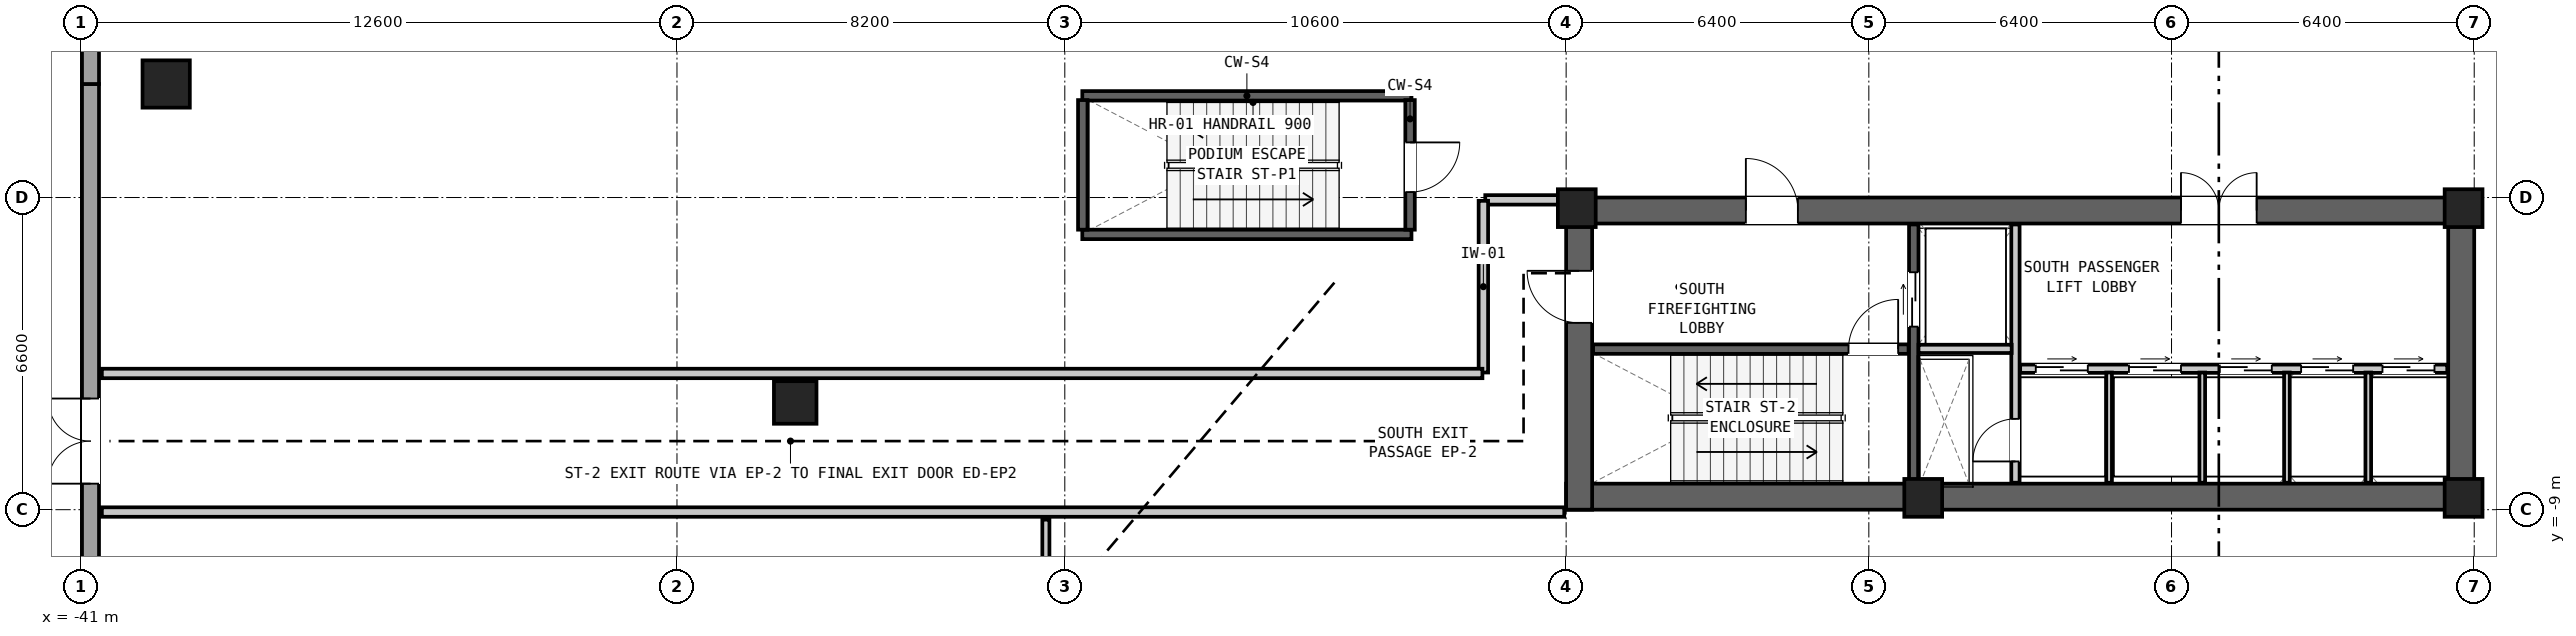
"""IFC4 building model, lengths in metres.
Left out: names, types, materials, properties, quantities, classifications, styles, units other than length and angle.
Written with IfcOpenShell. Run it as: python <this file> out.ifc"""

import sys

from ifc_helpers import new_model, si_unit, direction, frame, frame_2d, origin, origin_2d, place, context, subcontext, project, spatial, rectangle, hollow_rectangle, extrude, element, fill, save


model = new_model("IFC4")
c1 = context("Model", 3, precision=1e-05, world=origin(), true_north=direction((0.0, 1.0)))
c2 = subcontext(c1, "Body", "Model", "MODEL_VIEW")
j1 = project(units=[si_unit("LENGTHUNIT", "METRE"), si_unit("PLANEANGLEUNIT", "RADIAN")], contexts=[c1])
p1 = place(None, origin())
s1 = spatial("IfcSite", under=j1, at=p1, CompositionType="ELEMENT")
p2 = place(p1, origin())
s2 = spatial("IfcBuilding", under=s1, at=p2, CompositionType="ELEMENT")
p3 = place(p2, origin())
s3 = spatial("IfcBuildingStorey", under=s2, at=p3, CompositionType="ELEMENT", Elevation=0.0)
p4 = place(p3, frame((-9.6, -8.725, 0.0), z_axis=(0.0, 0.0, 1.0), x_axis=(1.0, 0.0, 0.0)))
e1 = element("IfcWall", 1, at=p4, inside=s3, PredefinedType="SHEAR", context=c2, shape_type="SweptSolid", body=[
    extrude(rectangle(XDim=19.2, YDim=0.55, at=frame_2d((9.6, 0.0))), origin(), (0.0, 0.0, 1.0), 5.1),
])
p5 = place(p3, frame((-9.6, -2.675, 0.0), z_axis=(0.0, 0.0, 1.0), x_axis=(1.0, 0.0, 0.0)))
e2 = element("IfcWall", 2, at=p5, inside=s3, PredefinedType="SHEAR", context=c2, shape_type="SweptSolid", body=[
    extrude(rectangle(XDim=19.2, YDim=0.55, at=frame_2d((9.6, 0.0))), origin(), (0.0, 0.0, 1.0), 5.1),
])
p6 = place(p5, frame((3.8, 0.0, 0.0)))
e3 = element("IfcOpeningElement", 3, at=p6, cuts=e2, PredefinedType="OPENING", context=c2, shape_type="SweptSolid", body=[
    extrude(rectangle(XDim=1.1, YDim=2.08, at=frame_2d((0.55, 1.04))), frame((0.0, 0.287, 0.0), z_axis=(0.0, -1.0, 0.0), x_axis=(1.0, 0.0, 0.0)), (0.0, 0.0, 1.0), 0.574),
])
p7 = place(p5, frame((13.0, 0.0, 0.0)))
e4 = element("IfcOpeningElement", 4, at=p7, cuts=e2, PredefinedType="OPENING", context=c2, shape_type="SweptSolid", body=[
    extrude(rectangle(XDim=1.6, YDim=2.12, at=frame_2d((0.8, 1.06))), frame((0.0, 0.287, 0.0), z_axis=(0.0, -1.0, 0.0), x_axis=(1.0, 0.0, 0.0)), (0.0, 0.0, 1.0), 0.574),
])
p8 = place(p3, frame((-9.325, -9.0, 0.0), z_axis=(0.0, 0.0, 1.0), x_axis=(0.0, 1.0, 0.0)))
e5 = element("IfcWall", 5, at=p8, inside=s3, PredefinedType="SHEAR", context=c2, shape_type="SweptSolid", body=[
    extrude(rectangle(XDim=6.6, YDim=0.55, at=frame_2d((3.3, 0.0))), origin(), (0.0, 0.0, 1.0), 5.1),
])
p9 = place(p8, frame((3.95, 0.0, 0.0)))
e6 = element("IfcOpeningElement", 6, at=p9, cuts=e5, PredefinedType="OPENING", context=c2, shape_type="SweptSolid", body=[
    extrude(rectangle(XDim=1.1, YDim=2.08, at=frame_2d((0.55, 1.04))), frame((0.0, 0.287, 0.0), z_axis=(0.0, -1.0, 0.0), x_axis=(1.0, 0.0, 0.0)), (0.0, 0.0, 1.0), 0.574),
])
p10 = place(p3, frame((9.325, -9.0, 0.0), z_axis=(0.0, 0.0, 1.0), x_axis=(0.0, 1.0, 0.0)))
e7 = element("IfcWall", 7, at=p10, inside=s3, PredefinedType="SHEAR", context=c2, shape_type="SweptSolid", body=[
    extrude(rectangle(XDim=6.6, YDim=0.55, at=frame_2d((3.3, 0.0))), origin(), (0.0, 0.0, 1.0), 5.1),
])
p11 = place(p3, frame((-25.9, -6.733, 0.0), z_axis=(0.0, 0.0, 1.0), x_axis=(0.0, 1.0, 0.0)))
e8 = element("IfcColumn", 8, at=p11, inside=s3, PredefinedType="COLUMN", context=c2, shape_type="SweptSolid", body=[
    extrude(hollow_rectangle(XDim=0.9, YDim=0.9, WallThickness=0.055, at=origin_2d()), origin(), (0.0, 0.0, 1.0), 5.1),
])
p12 = place(p3, frame((-39.2, 0.0, 0.0), z_axis=(0.0, 0.0, 1.0), x_axis=(1.0, 0.0, 0.0)))
e9 = element("IfcColumn", 9, at=p12, inside=s3, PredefinedType="COLUMN", context=c2, shape_type="SweptSolid", body=[
    extrude(rectangle(XDim=1.0, YDim=1.0, at=origin_2d()), origin(), (0.0, 0.0, 1.0), 5.1),
])
for number, where, z_axis, x_axis in (
    (10, (-9.375, -2.625, 0.0), (0.0, 0.0, 1.0), (1.0, 0.0, 0.0)),
    (11, (9.375, -2.625, 0.0), (0.0, 0.0, 1.0), (1.0, 0.0, 0.0)),
    (12, (-2.05, -8.75, 0.0), (0.0, 0.0, 1.0), (1.0, 0.0, 0.0)),
    (13, (9.375, -8.75, 0.0), (0.0, 0.0, 1.0), (1.0, 0.0, 0.0)),
):
    element("IfcColumn", number, at=place(p3, frame(where, z_axis=z_axis, x_axis=x_axis)), inside=s3, PredefinedType="COLUMN", context=c2, shape_type="SweptSolid", body=[
        extrude(rectangle(XDim=0.8, YDim=0.8, at=origin_2d()), origin(), (0.0, 0.0, 1.0), 5.1),
    ])
p13 = place(p3, frame((-40.8, -27.8, 0.0), z_axis=(0.0, 0.0, 1.0), x_axis=(0.0, 1.0, 0.0)))
e14 = element("IfcWall", 14, at=p13, inside=s3, PredefinedType="SOLIDWALL", context=c2, shape_type="SweptSolid", body=[
    extrude(rectangle(XDim=27.8, YDim=0.36, at=frame_2d((13.9, 0.0))), origin(), (0.0, 0.0, 1.0), 4.78),
])
p14 = place(p13, frame((19.35, 0.0, 0.0)))
e15 = element("IfcOpeningElement", 15, at=p14, cuts=e14, PredefinedType="OPENING", context=c2, shape_type="SweptSolid", body=[
    extrude(rectangle(XDim=1.8, YDim=2.25, at=frame_2d((0.9, 1.125))), frame((0.0, 0.192, 0.0), z_axis=(0.0, -1.0, 0.0), x_axis=(1.0, 0.0, 0.0)), (0.0, 0.0, 1.0), 0.384),
])
p15 = place(p3, frame((-40.8, 0.0, 0.0), z_axis=(0.0, 0.0, 1.0), x_axis=(0.0, 1.0, 0.0)))
e16 = element("IfcWall", 16, at=p15, inside=s3, PredefinedType="SOLIDWALL", context=c2, shape_type="SweptSolid", body=[
    extrude(rectangle(XDim=27.8, YDim=0.36, at=frame_2d((13.9, 0.0))), origin(), (0.0, 0.0, 1.0), 4.78),
])
p16 = place(p3, frame((-9.03, -5.605, 0.0), z_axis=(0.0, 0.0, 1.0), x_axis=(1.0, 0.0, 0.0)))
e17 = element("IfcWall", 17, at=p16, inside=s3, PredefinedType="SHEAR", context=c2, shape_type="SweptSolid", body=[
    extrude(rectangle(XDim=6.67, YDim=0.2, at=frame_2d((3.335, 0.0))), origin(), (0.0, 0.0, 1.0), 4.78),
])
p17 = place(p16, frame((5.4, 0.0, 0.0)))
e18 = element("IfcOpeningElement", 18, at=p17, cuts=e17, PredefinedType="OPENING", context=c2, shape_type="SweptSolid", body=[
    extrude(rectangle(XDim=1.05, YDim=2.08, at=frame_2d((0.525, 1.04))), frame((0.0, 0.112, 0.0), z_axis=(0.0, -1.0, 0.0), x_axis=(1.0, 0.0, 0.0)), (0.0, 0.0, 1.0), 0.224),
])
p18 = place(p3, frame((-2.25, -8.43, 0.0), z_axis=(0.0, 0.0, 1.0), x_axis=(0.0, 1.0, 0.0)))
e19 = element("IfcWall", 19, at=p18, inside=s3, PredefinedType="SHEAR", context=c2, shape_type="SweptSolid", body=[
    extrude(rectangle(XDim=5.46, YDim=0.2, at=frame_2d((2.73, 0.0))), origin(), (0.0, 0.0, 1.0), 4.78),
])
p19 = place(p18, frame((3.3, 0.0, 0.0)))
e20 = element("IfcOpeningElement", 20, at=p19, cuts=e19, PredefinedType="OPENING", context=c2, shape_type="SweptSolid", body=[
    extrude(rectangle(XDim=1.15, YDim=2.08, at=frame_2d((0.575, 1.04))), frame((0.0, 0.112, 0.0), z_axis=(0.0, -1.0, 0.0), x_axis=(1.0, 0.0, 0.0)), (0.0, 0.0, 1.0), 0.224),
])
p20 = place(p3, frame((-0.1, -8.43, 0.0), z_axis=(0.0, 0.0, 1.0), x_axis=(0.0, 1.0, 0.0)))
e21 = element("IfcWall", 21, at=p20, inside=s3, PredefinedType="PARTITIONING", context=c2, shape_type="SweptSolid", body=[
    extrude(rectangle(XDim=5.46, YDim=0.175, at=frame_2d((2.73, 0.0))), origin(), (0.0, 0.0, 1.0), 4.78),
])
p21 = place(p20, frame((0.45, 0.0, 0.0)))
e22 = element("IfcOpeningElement", 22, at=p21, cuts=e21, PredefinedType="OPENING", context=c2, shape_type="SweptSolid", body=[
    extrude(rectangle(XDim=0.9, YDim=2.05, at=frame_2d((0.45, 1.025))), frame((0.0, 0.1, 0.0), z_axis=(0.0, -1.0, 0.0), x_axis=(1.0, 0.0, 0.0)), (0.0, 0.0, 1.0), 0.199),
])
p22 = place(p3, frame((-2.15, -5.6, 0.0), z_axis=(0.0, 0.0, 1.0), x_axis=(1.0, 0.0, 0.0)))
e23 = element("IfcWall", 23, at=p22, inside=s3, PredefinedType="PARTITIONING", context=c2, shape_type="SweptSolid", body=[
    extrude(rectangle(XDim=1.97, YDim=0.175, at=frame_2d((0.985, 0.0))), origin(), (0.0, 0.0, 1.0), 4.78),
])
p23 = place(p3, frame((0.0, -6.02, 0.0), z_axis=(0.0, 0.0, 1.0), x_axis=(1.0, 0.0, 0.0)))
e24 = element("IfcWall", 24, at=p23, inside=s3, PredefinedType="PARTITIONING", context=c2, shape_type="SweptSolid", body=[
    extrude(rectangle(XDim=9.03, YDim=0.175, at=frame_2d((4.515, 0.0))), origin(), (0.0, 0.0, 1.0), 4.78),
])
p24 = place(p23, frame((0.33, 0.0, 0.0)))
e25 = element("IfcOpeningElement", 25, at=p24, cuts=e24, PredefinedType="OPENING", context=c2, shape_type="SweptSolid", body=[
    extrude(rectangle(XDim=1.1, YDim=2.06, at=frame_2d((0.55, 1.03))), frame((0.0, 0.1, 0.0), z_axis=(0.0, -1.0, 0.0), x_axis=(1.0, 0.0, 0.0)), (0.0, 0.0, 1.0), 0.199),
])
p25 = place(p23, frame((2.3, 0.0, 0.0)))
e26 = element("IfcOpeningElement", 26, at=p25, cuts=e24, PredefinedType="OPENING", context=c2, shape_type="SweptSolid", body=[
    extrude(rectangle(XDim=1.1, YDim=2.06, at=frame_2d((0.55, 1.03))), frame((0.0, 0.1, 0.0), z_axis=(0.0, -1.0, 0.0), x_axis=(1.0, 0.0, 0.0)), (0.0, 0.0, 1.0), 0.199),
])
p26 = place(p23, frame((4.22, 0.0, 0.0)))
e27 = element("IfcOpeningElement", 27, at=p26, cuts=e24, PredefinedType="OPENING", context=c2, shape_type="SweptSolid", body=[
    extrude(rectangle(XDim=1.1, YDim=2.06, at=frame_2d((0.55, 1.03))), frame((0.0, 0.1, 0.0), z_axis=(0.0, -1.0, 0.0), x_axis=(1.0, 0.0, 0.0)), (0.0, 0.0, 1.0), 0.199),
])
p27 = place(p23, frame((5.94, 0.0, 0.0)))
e28 = element("IfcOpeningElement", 28, at=p27, cuts=e24, PredefinedType="OPENING", context=c2, shape_type="SweptSolid", body=[
    extrude(rectangle(XDim=1.1, YDim=2.06, at=frame_2d((0.55, 1.03))), frame((0.0, 0.1, 0.0), z_axis=(0.0, -1.0, 0.0), x_axis=(1.0, 0.0, 0.0)), (0.0, 0.0, 1.0), 0.199),
])
p28 = place(p23, frame((7.66, 0.0, 0.0)))
e29 = element("IfcOpeningElement", 29, at=p28, cuts=e24, PredefinedType="OPENING", context=c2, shape_type="SweptSolid", body=[
    extrude(rectangle(XDim=1.1, YDim=2.06, at=frame_2d((0.55, 1.03))), frame((0.0, 0.1, 0.0), z_axis=(0.0, -1.0, 0.0), x_axis=(1.0, 0.0, 0.0)), (0.0, 0.0, 1.0), 0.199),
])
for number, where, z_axis, x_axis in (
    (30, (1.88, -8.43, 0.0), (0.0, 0.0, 1.0), (0.0, 1.0, 0.0)),
    (31, (3.85, -8.43, 0.0), (0.0, 0.0, 1.0), (0.0, 1.0, 0.0)),
    (32, (5.64, -8.43, 0.0), (0.0, 0.0, 1.0), (0.0, 1.0, 0.0)),
    (33, (7.36, -8.43, 0.0), (0.0, 0.0, 1.0), (0.0, 1.0, 0.0)),
):
    element("IfcWall", number, at=place(p3, frame(where, z_axis=z_axis, x_axis=x_axis)), inside=s3, PredefinedType="PARTITIONING", context=c2, shape_type="SweptSolid", body=[
        extrude(rectangle(XDim=2.33, YDim=0.12, at=frame_2d((1.165, 0.0))), origin(), (0.0, 0.0, 1.0), 4.78),
    ])
for number, where, z_axis, x_axis in (
    (34, (-19.83, -0.25, 0.0), (0.0, 0.0, 1.0), (1.0, 0.0, 0.0)),
    (35, (-19.83, -3.18, 0.0), (0.0, 0.0, 1.0), (1.0, 0.0, 0.0)),
):
    element("IfcWall", number, at=place(p3, frame(where, z_axis=z_axis, x_axis=x_axis)), inside=s3, PredefinedType="SHEAR", context=c2, shape_type="SweptSolid", body=[
        extrude(rectangle(XDim=6.96, YDim=0.2, at=frame_2d((3.48, 0.0))), origin(), (0.0, 0.0, 1.0), 4.78),
    ])
p29 = place(p3, frame((-12.9, -0.34, 0.0), z_axis=(0.0, 0.0, 1.0), x_axis=(0.0, -1.0, 0.0)))
e36 = element("IfcWall", 36, at=p29, inside=s3, PredefinedType="SHEAR", context=c2, shape_type="SweptSolid", body=[
    extrude(rectangle(XDim=2.74, YDim=0.2, at=frame_2d((1.37, 0.0))), origin(), (0.0, 0.0, 1.0), 4.78),
])
p30 = place(p29, frame((0.895, 0.0, 0.0)))
e37 = element("IfcOpeningElement", 37, at=p30, cuts=e36, PredefinedType="OPENING", context=c2, shape_type="SweptSolid", body=[
    extrude(rectangle(XDim=1.05, YDim=2.08, at=frame_2d((0.525, 1.04))), frame((0.0, 0.112, 0.0), z_axis=(0.0, -1.0, 0.0), x_axis=(1.0, 0.0, 0.0)), (0.0, 0.0, 1.0), 0.224),
])
p31 = place(p3, frame((-19.82, -3.08, 0.0), z_axis=(0.0, 0.0, 1.0), x_axis=(0.0, 1.0, 0.0)))
e38 = element("IfcWall", 38, at=p31, inside=s3, PredefinedType="SHEAR", context=c2, shape_type="SweptSolid", body=[
    extrude(rectangle(XDim=2.74, YDim=0.2, at=frame_2d((1.37, 0.0))), origin(), (0.0, 0.0, 1.0), 4.78),
])
p32 = place(p3, frame((-40.56, -9.05, 0.0), z_axis=(0.0, 0.0, 1.0), x_axis=(1.0, 0.0, 0.0)))
e39 = element("IfcWall", 39, at=p32, inside=s3, PredefinedType="PARTITIONING", context=c2, shape_type="SweptSolid", body=[
    extrude(rectangle(XDim=30.92, YDim=0.2, at=frame_2d((15.46, 0.0))), origin(), (0.0, 0.0, 1.0), 4.78),
])
p33 = place(p3, frame((-9.64, -2.45, 0.0), z_axis=(0.0, 0.0, 1.0), x_axis=(-1.0, 0.0, 0.0)))
e40 = element("IfcWall", 40, at=p33, inside=s3, PredefinedType="PARTITIONING", context=c2, shape_type="SweptSolid", body=[
    extrude(rectangle(XDim=1.67, YDim=0.2, at=frame_2d((0.835, 0.0))), origin(), (0.0, 0.0, 1.0), 4.78),
])
p34 = place(p3, frame((-11.35, -2.47, 0.0), z_axis=(0.0, 0.0, 1.0), x_axis=(0.0, -1.0, 0.0)))
e41 = element("IfcWall", 41, at=p34, inside=s3, PredefinedType="PARTITIONING", context=c2, shape_type="SweptSolid", body=[
    extrude(rectangle(XDim=3.63, YDim=0.2, at=frame_2d((1.815, 0.0))), origin(), (0.0, 0.0, 1.0), 4.78),
])
p35 = place(p3, frame((-11.37, -6.12, 0.0), z_axis=(0.0, 0.0, 1.0), x_axis=(-1.0, 0.0, 0.0)))
e42 = element("IfcWall", 42, at=p35, inside=s3, PredefinedType="PARTITIONING", context=c2, shape_type="SweptSolid", body=[
    extrude(rectangle(XDim=29.19, YDim=0.2, at=frame_2d((14.595, 0.0))), origin(), (0.0, 0.0, 1.0), 4.78),
])
p36 = place(p3, frame((-20.6, -25.74, 0.0), z_axis=(0.0, 0.0, 1.0), x_axis=(0.0, 1.0, 0.0)))
e43 = element("IfcWall", 43, at=p36, inside=s3, PredefinedType="PARTITIONING", context=c2, shape_type="SweptSolid", body=[
    extrude(rectangle(XDim=16.53, YDim=0.15, at=frame_2d((8.265, 0.0))), origin(), (0.0, 0.0, 1.0), 3.833),
])
p37 = place(p36, frame((10.971, 0.0, 0.0)))
e44 = element("IfcOpeningElement", 44, at=p37, cuts=e43, PredefinedType="OPENING", context=c2, shape_type="SweptSolid", body=[
    extrude(rectangle(XDim=1.2, YDim=2.1, at=frame_2d((0.6, 1.05))), frame((0.0, 0.087, 0.0), z_axis=(0.0, -1.0, 0.0), x_axis=(1.0, 0.0, 0.0)), (0.0, 0.0, 1.0), 0.174),
])
p38 = place(p14, origin())
e45 = element("IfcDoor", 45, at=p38, inside=s3, OperationType="DOUBLE_DOOR_SINGLE_SWING", PredefinedType="DOOR", context=c2, shape_type="SweptSolid", body=[
    extrude(rectangle(XDim=1.8, YDim=2.25, at=frame_2d((0.9, 1.125))), frame((0.0, 0.025, 0.0), z_axis=(0.0, -1.0, 0.0), x_axis=(1.0, 0.0, 0.0)), (0.0, 0.0, 1.0), 0.05),
])
fill(e15, e45)
p39 = place(p17, origin())
e46 = element("IfcDoor", 46, at=p39, inside=s3, OperationType="SINGLE_SWING_RIGHT", PredefinedType="DOOR", context=c2, shape_type="SweptSolid", body=[
    extrude(rectangle(XDim=1.05, YDim=2.08, at=frame_2d((0.525, 1.04))), frame((0.0, 0.025, 0.0), z_axis=(0.0, -1.0, 0.0), x_axis=(1.0, 0.0, 0.0)), (0.0, 0.0, 1.0), 0.05),
])
fill(e18, e46)
p40 = place(p6, origin())
e47 = element("IfcDoor", 47, at=p40, inside=s3, OperationType="SINGLE_SWING_LEFT", PredefinedType="DOOR", context=c2, shape_type="SweptSolid", body=[
    extrude(rectangle(XDim=1.1, YDim=2.08, at=frame_2d((0.55, 1.04))), frame((0.0, 0.025, 0.0), z_axis=(0.0, -1.0, 0.0), x_axis=(1.0, 0.0, 0.0)), (0.0, 0.0, 1.0), 0.05),
])
fill(e3, e47)
p41 = place(p19, origin())
e48 = element("IfcDoor", 48, at=p41, inside=s3, OperationType="DOUBLE_DOOR_SLIDING", PredefinedType="DOOR", context=c2, shape_type="SweptSolid", body=[
    extrude(rectangle(XDim=1.15, YDim=2.08, at=frame_2d((0.575, 1.04))), frame((0.0, 0.025, 0.0), z_axis=(0.0, -1.0, 0.0), x_axis=(1.0, 0.0, 0.0)), (0.0, 0.0, 1.0), 0.05),
])
fill(e20, e48)
p42 = place(p21, origin())
e49 = element("IfcDoor", 49, at=p42, inside=s3, OperationType="SINGLE_SWING_LEFT", PredefinedType="DOOR", context=c2, shape_type="SweptSolid", body=[
    extrude(rectangle(XDim=0.9, YDim=2.05, at=frame_2d((0.45, 1.025))), frame((0.0, 0.025, 0.0), z_axis=(0.0, -1.0, 0.0), x_axis=(1.0, 0.0, 0.0)), (0.0, 0.0, 1.0), 0.05),
])
fill(e22, e49)
p43 = place(p24, origin())
e50 = element("IfcDoor", 50, at=p43, inside=s3, OperationType="DOUBLE_DOOR_SLIDING", PredefinedType="DOOR", context=c2, shape_type="SweptSolid", body=[
    extrude(rectangle(XDim=1.1, YDim=2.06, at=frame_2d((0.55, 1.03))), frame((0.0, 0.025, 0.0), z_axis=(0.0, -1.0, 0.0), x_axis=(1.0, 0.0, 0.0)), (0.0, 0.0, 1.0), 0.05),
])
fill(e25, e50)
p44 = place(p25, origin())
e51 = element("IfcDoor", 51, at=p44, inside=s3, OperationType="DOUBLE_DOOR_SLIDING", PredefinedType="DOOR", context=c2, shape_type="SweptSolid", body=[
    extrude(rectangle(XDim=1.1, YDim=2.06, at=frame_2d((0.55, 1.03))), frame((0.0, 0.025, 0.0), z_axis=(0.0, -1.0, 0.0), x_axis=(1.0, 0.0, 0.0)), (0.0, 0.0, 1.0), 0.05),
])
fill(e26, e51)
p45 = place(p26, origin())
e52 = element("IfcDoor", 52, at=p45, inside=s3, OperationType="DOUBLE_DOOR_SLIDING", PredefinedType="DOOR", context=c2, shape_type="SweptSolid", body=[
    extrude(rectangle(XDim=1.1, YDim=2.06, at=frame_2d((0.55, 1.03))), frame((0.0, 0.025, 0.0), z_axis=(0.0, -1.0, 0.0), x_axis=(1.0, 0.0, 0.0)), (0.0, 0.0, 1.0), 0.05),
])
fill(e27, e52)
p46 = place(p27, origin())
e53 = element("IfcDoor", 53, at=p46, inside=s3, OperationType="DOUBLE_DOOR_SLIDING", PredefinedType="DOOR", context=c2, shape_type="SweptSolid", body=[
    extrude(rectangle(XDim=1.1, YDim=2.06, at=frame_2d((0.55, 1.03))), frame((0.0, 0.025, 0.0), z_axis=(0.0, -1.0, 0.0), x_axis=(1.0, 0.0, 0.0)), (0.0, 0.0, 1.0), 0.05),
])
fill(e28, e53)
p47 = place(p28, origin())
e54 = element("IfcDoor", 54, at=p47, inside=s3, OperationType="DOUBLE_DOOR_SLIDING", PredefinedType="DOOR", context=c2, shape_type="SweptSolid", body=[
    extrude(rectangle(XDim=1.1, YDim=2.06, at=frame_2d((0.55, 1.03))), frame((0.0, 0.025, 0.0), z_axis=(0.0, -1.0, 0.0), x_axis=(1.0, 0.0, 0.0)), (0.0, 0.0, 1.0), 0.05),
])
fill(e29, e54)
p48 = place(p7, origin())
e55 = element("IfcDoor", 55, at=p48, inside=s3, OperationType="DOUBLE_DOOR_SINGLE_SWING", PredefinedType="DOOR", context=c2, shape_type="SweptSolid", body=[
    extrude(rectangle(XDim=1.6, YDim=2.12, at=frame_2d((0.8, 1.06))), frame((0.0, 0.025, 0.0), z_axis=(0.0, -1.0, 0.0), x_axis=(1.0, 0.0, 0.0)), (0.0, 0.0, 1.0), 0.05),
])
fill(e4, e55)
p49 = place(p30, origin())
e56 = element("IfcDoor", 56, at=p49, inside=s3, OperationType="SINGLE_SWING_LEFT", PredefinedType="DOOR", context=c2, shape_type="SweptSolid", body=[
    extrude(rectangle(XDim=1.05, YDim=2.08, at=frame_2d((0.525, 1.04))), frame((0.0, 0.025, 0.0), z_axis=(0.0, -1.0, 0.0), x_axis=(1.0, 0.0, 0.0)), (0.0, 0.0, 1.0), 0.05),
])
fill(e37, e56)
p50 = place(p9, origin())
e57 = element("IfcDoor", 57, at=p50, inside=s3, OperationType="SINGLE_SWING_RIGHT", PredefinedType="DOOR", context=c2, shape_type="SweptSolid", body=[
    extrude(rectangle(XDim=1.1, YDim=2.08, at=frame_2d((0.55, 1.04))), frame((0.0, 0.025, 0.0), z_axis=(0.0, -1.0, 0.0), x_axis=(1.0, 0.0, 0.0)), (0.0, 0.0, 1.0), 0.05),
])
fill(e6, e57)
save(model, sys.argv[1])
